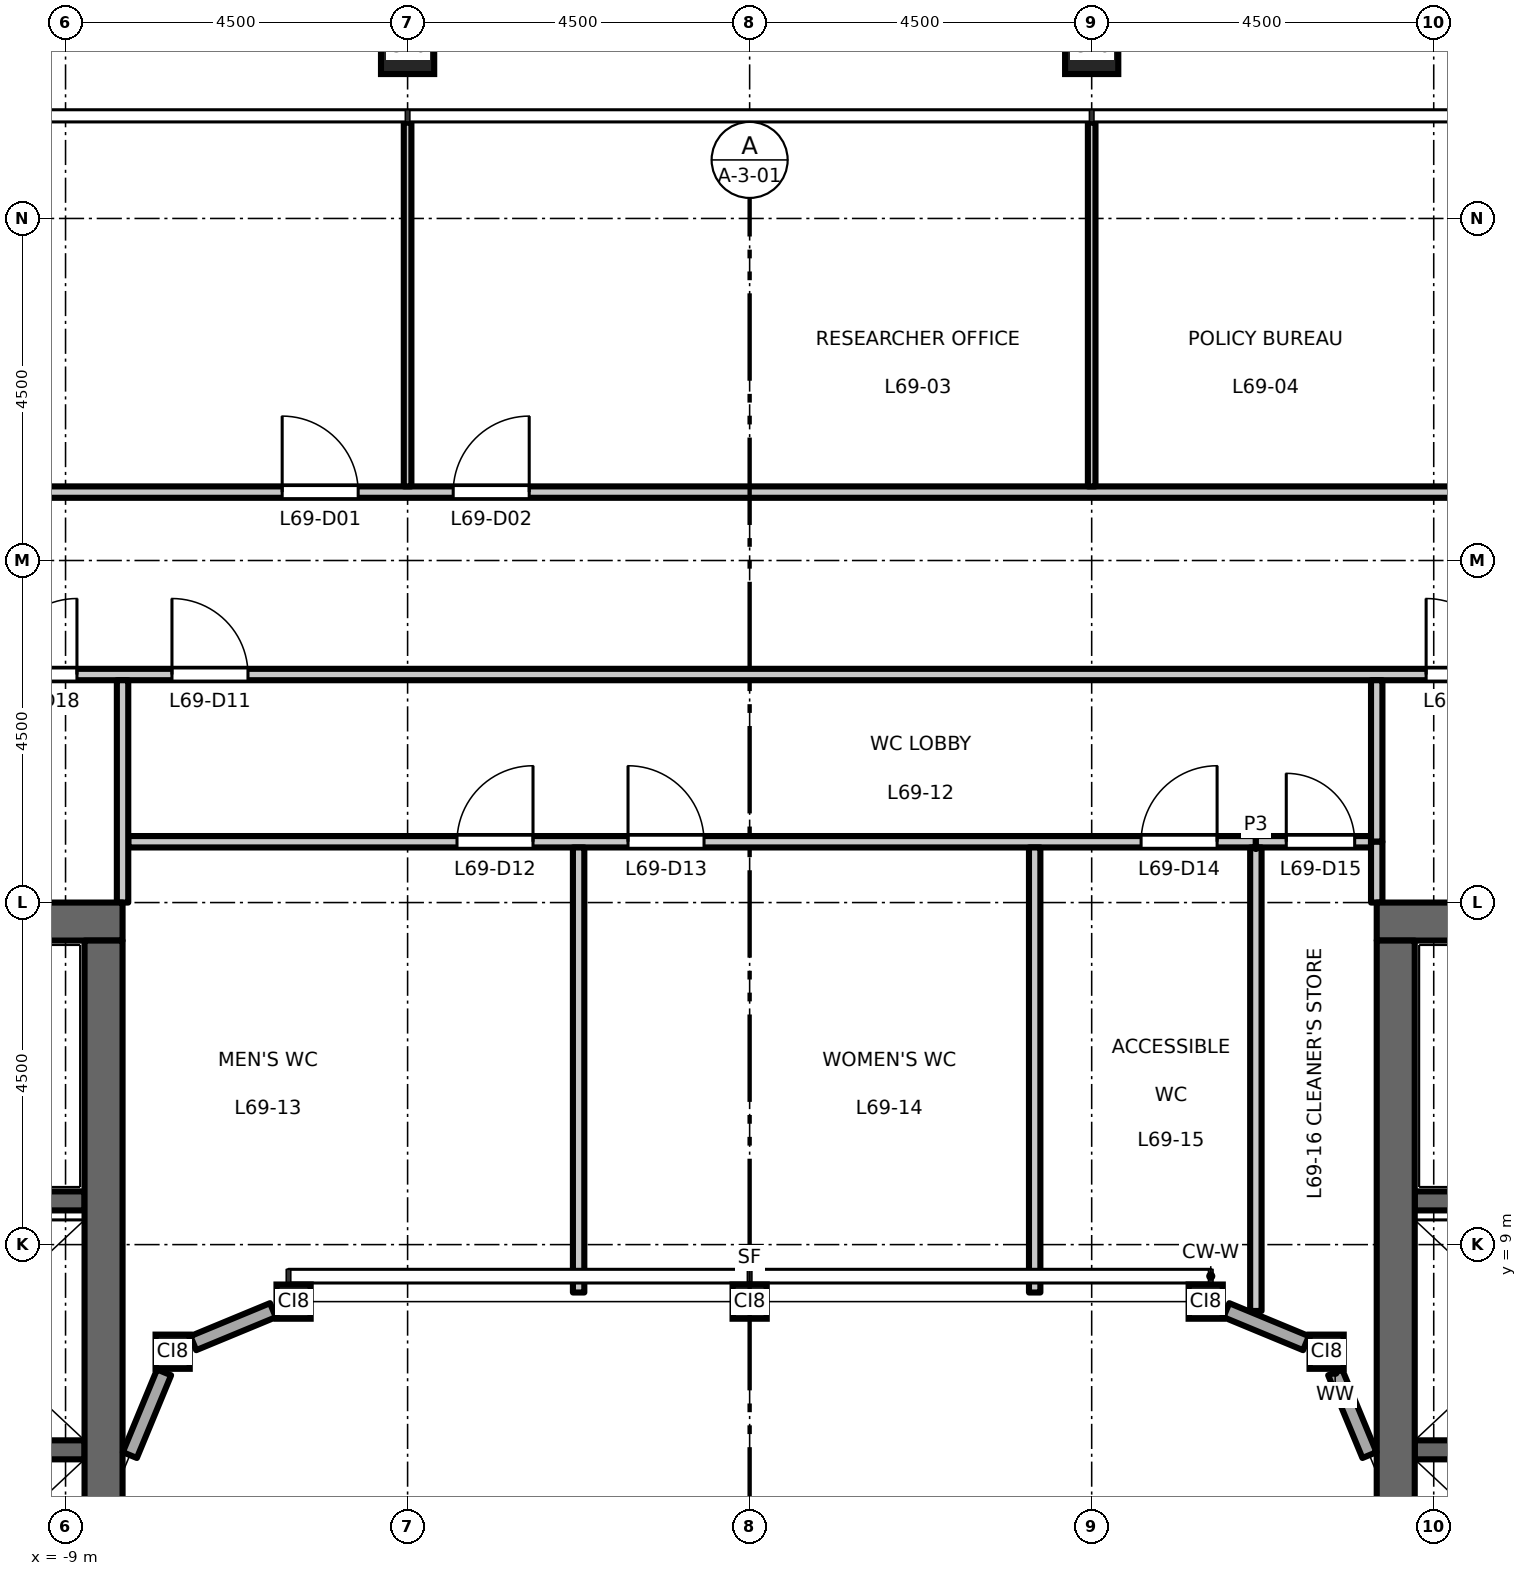
"""IFC4 building model, lengths in metres.
Left out: names, types, materials, properties, quantities, classifications, styles, units other than length and angle.
Written with IfcOpenShell. Run it as: python <this file> out.ifc"""

import sys

from ifc_helpers import new_model, si_unit, direction, frame, frame_2d, origin, origin_2d, place, context, subcontext, project, spatial, rectangle, hollow_rectangle, extrude, element, fill, save


model = new_model("IFC4")
c1 = context("Model", 3, precision=1e-05, world=origin(), true_north=direction((0.0, 1.0)))
c2 = subcontext(c1, "Body", "Model", "MODEL_VIEW")
j1 = project(units=[si_unit("LENGTHUNIT", "METRE"), si_unit("PLANEANGLEUNIT", "RADIAN")], contexts=[c1])
p1 = place(None, origin())
s1 = spatial("IfcSite", under=j1, at=p1, CompositionType="ELEMENT")
p2 = place(p1, origin())
s2 = spatial("IfcBuilding", under=s1, at=p2, CompositionType="ELEMENT")
p3 = place(p2, frame((0.0, 0.0, 321.2)))
s3 = spatial("IfcBuildingStorey", under=s2, at=p3, CompositionType="ELEMENT", Elevation=321.2)
for number, where, z_axis, x_axis in (
    (1, (4.5, 24.75, 0.0), (0.0, 0.0, 1.0), (1.0, 0.0, 0.0)),
    (2, (-4.5, 24.75, 0.0), (0.0, 0.0, 1.0), (1.0, 0.0, 0.0)),
):
    element("IfcColumn", number, at=place(p3, frame(where, z_axis=z_axis, x_axis=x_axis)), inside=s3, PredefinedType="COLUMN", context=c2, shape_type="SweptSolid", body=[
        extrude(hollow_rectangle(XDim=0.7, YDim=0.7, WallThickness=0.036, at=origin_2d()), origin(), (0.0, 0.0, 1.0), 4.5),
    ])
for number, where, z_axis, x_axis in (
    (3, (-7.591, 7.591, 0.0), (0.0, 0.0, 1.0), (1.0, 0.0, 0.0)),
    (4, (-6.0, 8.25, 0.0), (0.0, 0.0, 1.0), (1.0, 0.0, 0.0)),
    (5, (0.0, 8.25, 0.0), (0.0, 0.0, 1.0), (1.0, 0.0, 0.0)),
    (6, (6.0, 8.25, 0.0), (0.0, 0.0, 1.0), (1.0, 0.0, 0.0)),
    (7, (7.591, 7.591, 0.0), (0.0, 0.0, 1.0), (1.0, 0.0, 0.0)),
):
    element("IfcColumn", number, at=place(p3, frame(where, z_axis=z_axis, x_axis=x_axis)), inside=s3, PredefinedType="COLUMN", context=c2, shape_type="SweptSolid", body=[
        extrude(hollow_rectangle(XDim=0.45, YDim=0.45, WallThickness=0.022, at=origin_2d()), origin(), (0.0, 0.0, 1.0), 4.5),
    ])
p4 = place(p3, frame((-8.75, 6.3, 0.0), z_axis=(0.0, 0.0, 1.0), x_axis=(-1.0, 0.0, 0.0)))
e8 = element("IfcWall", 8, at=p4, inside=s3, PredefinedType="SHEAR", context=c2, shape_type="SweptSolid", body=[
    extrude(rectangle(XDim=3.1, YDim=0.25, at=frame_2d((1.55, 0.0))), origin(), (0.0, 0.0, 1.0), 4.35),
])
p5 = place(p3, frame((-8.75, 9.575, 0.0), z_axis=(0.0, 0.0, 1.0), x_axis=(-1.0, 0.0, 0.0)))
e9 = element("IfcWall", 9, at=p5, inside=s3, PredefinedType="SHEAR", context=c2, shape_type="SweptSolid", body=[
    extrude(rectangle(XDim=8.0, YDim=0.25, at=frame_2d((4.0, 0.0))), origin(), (0.0, 0.0, 1.0), 4.35),
])
p6 = place(p5, frame((6.65, 0.0, 0.0)))
e10 = element("IfcOpeningElement", 10, at=p6, cuts=e9, PredefinedType="OPENING", context=c2, shape_type="SweptSolid", body=[
    extrude(rectangle(XDim=1.1, YDim=2.1, at=frame_2d((0.55, 1.05))), frame((0.0, 0.135, 0.0), z_axis=(0.0, -1.0, 0.0), x_axis=(1.0, 0.0, 0.0)), (0.0, 0.0, 1.0), 0.27),
])
p7 = place(p3, frame((-8.25, 13.25, 0.0), z_axis=(0.0, 0.0, 1.0), x_axis=(-1.0, 0.0, 0.0)))
e11 = element("IfcWall", 11, at=p7, inside=s3, PredefinedType="SHEAR", context=c2, shape_type="SweptSolid", body=[
    extrude(rectangle(XDim=9.0, YDim=0.5, at=frame_2d((4.5, 0.0))), origin(), (0.0, 0.0, 1.0), 4.35),
])
p8 = place(p3, frame((-8.5, -13.0, 0.0), z_axis=(0.0, 0.0, 1.0), x_axis=(0.0, 1.0, 0.0)))
e12 = element("IfcWall", 12, at=p8, inside=s3, PredefinedType="SHEAR", context=c2, shape_type="SweptSolid", body=[
    extrude(rectangle(XDim=26.0, YDim=0.5, at=frame_2d((13.0, 0.0))), origin(), (0.0, 0.0, 1.0), 4.35),
])
p9 = place(p3, frame((8.75, 6.3, 0.0), z_axis=(0.0, 0.0, 1.0), x_axis=(1.0, 0.0, 0.0)))
e13 = element("IfcWall", 13, at=p9, inside=s3, PredefinedType="SHEAR", context=c2, shape_type="SweptSolid", body=[
    extrude(rectangle(XDim=3.1, YDim=0.25, at=frame_2d((1.55, 0.0))), origin(), (0.0, 0.0, 1.0), 4.35),
])
p10 = place(p3, frame((8.75, 9.575, 0.0), z_axis=(0.0, 0.0, 1.0), x_axis=(1.0, 0.0, 0.0)))
e14 = element("IfcWall", 14, at=p10, inside=s3, PredefinedType="SHEAR", context=c2, shape_type="SweptSolid", body=[
    extrude(rectangle(XDim=8.0, YDim=0.25, at=frame_2d((4.0, 0.0))), origin(), (0.0, 0.0, 1.0), 4.35),
])
p11 = place(p10, frame((6.65, 0.0, 0.0)))
e15 = element("IfcOpeningElement", 15, at=p11, cuts=e14, PredefinedType="OPENING", context=c2, shape_type="SweptSolid", body=[
    extrude(rectangle(XDim=1.1, YDim=2.1, at=frame_2d((0.55, 1.05))), frame((0.0, 0.135, 0.0), z_axis=(0.0, -1.0, 0.0), x_axis=(1.0, 0.0, 0.0)), (0.0, 0.0, 1.0), 0.27),
])
p12 = place(p3, frame((8.25, 13.25, 0.0), z_axis=(0.0, 0.0, 1.0), x_axis=(1.0, 0.0, 0.0)))
e16 = element("IfcWall", 16, at=p12, inside=s3, PredefinedType="SHEAR", context=c2, shape_type="SweptSolid", body=[
    extrude(rectangle(XDim=9.0, YDim=0.5, at=frame_2d((4.5, 0.0))), origin(), (0.0, 0.0, 1.0), 4.35),
])
p13 = place(p3, frame((8.5, -13.0, 0.0), z_axis=(0.0, 0.0, 1.0), x_axis=(0.0, 1.0, 0.0)))
e17 = element("IfcWall", 17, at=p13, inside=s3, PredefinedType="SHEAR", context=c2, shape_type="SweptSolid", body=[
    extrude(rectangle(XDim=26.0, YDim=0.5, at=frame_2d((13.0, 0.0))), origin(), (0.0, 0.0, 1.0), 4.35),
])
p14 = place(p3, frame((8.154, 6.231, 0.0), z_axis=(0.0, 0.0, 1.0), x_axis=(-0.382760542083, 0.92384758885, 0.0)))
e18 = element("IfcWall", 18, at=p14, inside=s3, PredefinedType="STANDARD", context=c2, shape_type="SweptSolid", body=[
    extrude(rectangle(XDim=1.178, YDim=0.2, at=frame_2d((0.589, 0.0))), origin(), (0.0, 0.0, 1.0), 4.01),
])
for number, where, z_axis, x_axis in (
    (19, (7.319, 7.703, 0.0), (0.0, 0.0, 1.0), (-0.924, 0.383, 0.0)),
    (20, (-6.271, 8.137, 0.0), (0.0, 0.0, 1.0), (-0.924, -0.383, 0.0)),
):
    element("IfcWall", number, at=place(p3, frame(where, z_axis=z_axis, x_axis=x_axis)), inside=s3, PredefinedType="STANDARD", context=c2, shape_type="SweptSolid", body=[
        extrude(rectangle(XDim=1.134, YDim=0.2, at=frame_2d((0.567, 0.0))), origin(), (0.0, 0.0, 1.0), 4.01),
    ])
p15 = place(p3, frame((-7.703, 7.319, 0.0), z_axis=(0.0, 0.0, 1.0), x_axis=(-0.382760542083, -0.92384758885, 0.0)))
e21 = element("IfcWall", 21, at=p15, inside=s3, PredefinedType="STANDARD", context=c2, shape_type="SweptSolid", body=[
    extrude(rectangle(XDim=1.178, YDim=0.2, at=frame_2d((0.589, 0.0))), origin(), (0.0, 0.0, 1.0), 4.01),
])
p16 = place(p3, frame((-8.175, 14.3, 0.0), z_axis=(0.0, 0.0, 1.0), x_axis=(1.0, 0.0, 0.0)))
e22 = element("IfcWall", 22, at=p16, inside=s3, PredefinedType="PARTITIONING", context=c2, shape_type="SweptSolid", body=[
    extrude(rectangle(XDim=14.835, YDim=0.15, at=frame_2d((7.417, 0.0))), origin(), (0.0, 0.0, 1.0), 4.35),
])
p17 = place(p16, frame((4.325, 0.0, 0.0)))
e23 = element("IfcOpeningElement", 23, at=p17, cuts=e22, PredefinedType="OPENING", context=c2, shape_type="SweptSolid", body=[
    extrude(rectangle(XDim=1.0, YDim=2.1, at=frame_2d((0.5, 1.05))), frame((0.0, 0.085, 0.0), z_axis=(0.0, -1.0, 0.0), x_axis=(1.0, 0.0, 0.0)), (0.0, 0.0, 1.0), 0.17),
])
p18 = place(p16, frame((6.575, 0.0, 0.0)))
e24 = element("IfcOpeningElement", 24, at=p18, cuts=e22, PredefinedType="OPENING", context=c2, shape_type="SweptSolid", body=[
    extrude(rectangle(XDim=1.0, YDim=2.1, at=frame_2d((0.5, 1.05))), frame((0.0, 0.085, 0.0), z_axis=(0.0, -1.0, 0.0), x_axis=(1.0, 0.0, 0.0)), (0.0, 0.0, 1.0), 0.17),
])
p19 = place(p16, frame((13.325, 0.0, 0.0)))
e25 = element("IfcOpeningElement", 25, at=p19, cuts=e22, PredefinedType="OPENING", context=c2, shape_type="SweptSolid", body=[
    extrude(rectangle(XDim=1.0, YDim=2.1, at=frame_2d((0.5, 1.05))), frame((0.0, 0.085, 0.0), z_axis=(0.0, -1.0, 0.0), x_axis=(1.0, 0.0, 0.0)), (0.0, 0.0, 1.0), 0.17),
])
p20 = place(p3, frame((6.66, 14.3, 0.0), z_axis=(0.0, 0.0, 1.0), x_axis=(1.0, 0.0, 0.0)))
e26 = element("IfcWall", 26, at=p20, inside=s3, PredefinedType="PARTITIONING", context=c2, shape_type="SweptSolid", body=[
    extrude(rectangle(XDim=1.515, YDim=0.15, at=frame_2d((0.758, 0.0))), origin(), (0.0, 0.0, 1.0), 4.35),
])
p21 = place(p20, frame((0.4, 0.0, 0.0)))
e27 = element("IfcOpeningElement", 27, at=p21, cuts=e26, PredefinedType="OPENING", context=c2, shape_type="SweptSolid", body=[
    extrude(rectangle(XDim=0.9, YDim=2.1, at=frame_2d((0.45, 1.05))), frame((0.0, 0.085, 0.0), z_axis=(0.0, -1.0, 0.0), x_axis=(1.0, 0.0, 0.0)), (0.0, 0.0, 1.0), 0.17),
])
p22 = place(p3, frame((-17.325, 16.5, 0.0), z_axis=(0.0, 0.0, 1.0), x_axis=(1.0, 0.0, 0.0)))
e28 = element("IfcWall", 28, at=p22, inside=s3, PredefinedType="PARTITIONING", context=c2, shape_type="SweptSolid", body=[
    extrude(rectangle(XDim=34.65, YDim=0.15, at=frame_2d((17.325, 0.0))), origin(), (0.0, 0.0, 1.0), 4.35),
])
p23 = place(p22, frame((9.725, 0.0, 0.0)))
e29 = element("IfcOpeningElement", 29, at=p23, cuts=e28, PredefinedType="OPENING", context=c2, shape_type="SweptSolid", body=[
    extrude(rectangle(XDim=1.0, YDim=2.1, at=frame_2d((0.5, 1.05))), frame((0.0, 0.085, 0.0), z_axis=(0.0, -1.0, 0.0), x_axis=(1.0, 0.0, 0.0)), (0.0, 0.0, 1.0), 0.17),
])
p24 = place(p22, frame((7.475, 0.0, 0.0)))
e30 = element("IfcOpeningElement", 30, at=p24, cuts=e28, PredefinedType="OPENING", context=c2, shape_type="SweptSolid", body=[
    extrude(rectangle(XDim=1.0, YDim=2.1, at=frame_2d((0.5, 1.05))), frame((0.0, 0.085, 0.0), z_axis=(0.0, -1.0, 0.0), x_axis=(1.0, 0.0, 0.0)), (0.0, 0.0, 1.0), 0.17),
])
p25 = place(p22, frame((26.225, 0.0, 0.0)))
e31 = element("IfcOpeningElement", 31, at=p25, cuts=e28, PredefinedType="OPENING", context=c2, shape_type="SweptSolid", body=[
    extrude(rectangle(XDim=1.0, YDim=2.1, at=frame_2d((0.5, 1.05))), frame((0.0, 0.085, 0.0), z_axis=(0.0, -1.0, 0.0), x_axis=(1.0, 0.0, 0.0)), (0.0, 0.0, 1.0), 0.17),
])
p26 = place(p3, frame((-21.441, 18.9, 0.0), z_axis=(0.0, 0.0, 1.0), x_axis=(1.0, 0.0, 0.0)))
e32 = element("IfcWall", 32, at=p26, inside=s3, PredefinedType="PARTITIONING", context=c2, shape_type="SweptSolid", body=[
    extrude(rectangle(XDim=42.882, YDim=0.15, at=frame_2d((21.441, 0.0))), origin(), (0.0, 0.0, 1.0), 4.35),
])
p27 = place(p26, frame((15.291, 0.0, 0.0)))
e33 = element("IfcOpeningElement", 33, at=p27, cuts=e32, PredefinedType="OPENING", context=c2, shape_type="SweptSolid", body=[
    extrude(rectangle(XDim=1.0, YDim=2.1, at=frame_2d((0.5, 1.05))), frame((0.0, 0.085, 0.0), z_axis=(0.0, -1.0, 0.0), x_axis=(1.0, 0.0, 0.0)), (0.0, 0.0, 1.0), 0.17),
])
p28 = place(p26, frame((17.541, 0.0, 0.0)))
e34 = element("IfcOpeningElement", 34, at=p28, cuts=e32, PredefinedType="OPENING", context=c2, shape_type="SweptSolid", body=[
    extrude(rectangle(XDim=1.0, YDim=2.1, at=frame_2d((0.5, 1.05))), frame((0.0, 0.085, 0.0), z_axis=(0.0, -1.0, 0.0), x_axis=(1.0, 0.0, 0.0)), (0.0, 0.0, 1.0), 0.17),
])
p29 = place(p26, frame((33.291, 0.0, 0.0)))
e35 = element("IfcOpeningElement", 35, at=p29, cuts=e32, PredefinedType="OPENING", context=c2, shape_type="SweptSolid", body=[
    extrude(rectangle(XDim=1.0, YDim=2.1, at=frame_2d((0.5, 1.05))), frame((0.0, 0.085, 0.0), z_axis=(0.0, -1.0, 0.0), x_axis=(1.0, 0.0, 0.0)), (0.0, 0.0, 1.0), 0.17),
])
p30 = place(p26, frame((6.291, 0.0, 0.0)))
e36 = element("IfcOpeningElement", 36, at=p30, cuts=e32, PredefinedType="OPENING", context=c2, shape_type="SweptSolid", body=[
    extrude(rectangle(XDim=1.0, YDim=2.1, at=frame_2d((0.5, 1.05))), frame((0.0, 0.085, 0.0), z_axis=(0.0, -1.0, 0.0), x_axis=(1.0, 0.0, 0.0)), (0.0, 0.0, 1.0), 0.17),
])
p31 = place(p26, frame((35.482, 0.0, 0.0)))
e37 = element("IfcOpeningElement", 37, at=p31, cuts=e32, PredefinedType="OPENING", context=c2, shape_type="SweptSolid", body=[
    extrude(rectangle(XDim=1.0, YDim=2.1, at=frame_2d((0.5, 1.05))), frame((0.0, 0.085, 0.0), z_axis=(0.0, -1.0, 0.0), x_axis=(1.0, 0.0, 0.0)), (0.0, 0.0, 1.0), 0.17),
])
p32 = place(p3, frame((-8.25, 13.5, 0.0), z_axis=(0.0, 0.0, 1.0), x_axis=(0.0, 1.0, 0.0)))
e38 = element("IfcWall", 38, at=p32, inside=s3, PredefinedType="PARTITIONING", context=c2, shape_type="SweptSolid", body=[
    extrude(rectangle(XDim=2.925, YDim=0.15, at=frame_2d((1.462, 0.0))), origin(), (0.0, 0.0, 1.0), 4.35),
])
p33 = place(p3, frame((-4.5, 18.975, 0.0), z_axis=(0.0, 0.0, 1.0), x_axis=(0.0, 1.0, 0.0)))
e39 = element("IfcWall", 39, at=p33, inside=s3, PredefinedType="PARTITIONING", context=c2, shape_type="SweptSolid", body=[
    extrude(rectangle(XDim=4.785, YDim=0.1, at=frame_2d((2.393, 0.0))), origin(), (0.0, 0.0, 1.0), 3.65),
])
for number, where, z_axis, x_axis in (
    (40, (-2.25, 8.37, 0.0), (0.0, 0.0, 1.0), (0.0, 1.0, 0.0)),
    (41, (3.75, 8.37, 0.0), (0.0, 0.0, 1.0), (0.0, 1.0, 0.0)),
):
    element("IfcWall", number, at=place(p3, frame(where, z_axis=z_axis, x_axis=x_axis)), inside=s3, PredefinedType="PARTITIONING", context=c2, shape_type="SweptSolid", body=[
        extrude(rectangle(XDim=5.855, YDim=0.15, at=frame_2d((2.927, 0.0))), origin(), (0.0, 0.0, 1.0), 4.35),
    ])
p34 = place(p3, frame((4.5, 18.975, 0.0), z_axis=(0.0, 0.0, 1.0), x_axis=(0.0, 1.0, 0.0)))
e42 = element("IfcWall", 42, at=p34, inside=s3, PredefinedType="PARTITIONING", context=c2, shape_type="SweptSolid", body=[
    extrude(rectangle(XDim=4.785, YDim=0.1, at=frame_2d((2.393, 0.0))), origin(), (0.0, 0.0, 1.0), 3.65),
])
p35 = place(p3, frame((6.66, 8.127, 0.0), z_axis=(0.0, 0.0, 1.0), x_axis=(0.0, 1.0, 0.0)))
e43 = element("IfcWall", 43, at=p35, inside=s3, PredefinedType="PARTITIONING", context=c2, shape_type="SweptSolid", body=[
    extrude(rectangle(XDim=6.098, YDim=0.15, at=frame_2d((3.049, 0.0))), origin(), (0.0, 0.0, 1.0), 4.35),
])
p36 = place(p3, frame((8.25, 14.3, 0.0), z_axis=(0.0, 0.0, 1.0), x_axis=(0.0, 1.0, 0.0)))
e44 = element("IfcWall", 44, at=p36, inside=s3, PredefinedType="PARTITIONING", context=c2, shape_type="SweptSolid", body=[
    extrude(rectangle(XDim=2.125, YDim=0.15, at=frame_2d((1.062, 0.0))), origin(), (0.0, 0.0, 1.0), 4.35),
])
p37 = place(p3, frame((8.25, 13.5, 0.0), z_axis=(0.0, 0.0, 1.0), x_axis=(0.0, 1.0, 0.0)))
e45 = element("IfcWall", 45, at=p37, inside=s3, PredefinedType="PARTITIONING", context=c2, shape_type="SweptSolid", body=[
    extrude(rectangle(XDim=0.8, YDim=0.15, at=frame_2d((0.4, 0.0))), origin(), (0.0, 0.0, 1.0), 4.35),
])
p38 = place(p27, origin())
e46 = element("IfcDoor", 46, at=p38, inside=s3, OperationType="SINGLE_SWING_LEFT", PredefinedType="DOOR", context=c2, shape_type="SweptSolid", body=[
    extrude(rectangle(XDim=1.0, YDim=2.1, at=frame_2d((0.5, 1.05))), frame((0.0, 0.025, 0.0), z_axis=(0.0, -1.0, 0.0), x_axis=(1.0, 0.0, 0.0)), (0.0, 0.0, 1.0), 0.05),
])
fill(e33, e46)
p39 = place(p28, origin())
e47 = element("IfcDoor", 47, at=p39, inside=s3, OperationType="SINGLE_SWING_RIGHT", PredefinedType="DOOR", context=c2, shape_type="SweptSolid", body=[
    extrude(rectangle(XDim=1.0, YDim=2.1, at=frame_2d((0.5, 1.05))), frame((0.0, 0.025, 0.0), z_axis=(0.0, -1.0, 0.0), x_axis=(1.0, 0.0, 0.0)), (0.0, 0.0, 1.0), 0.05),
])
fill(e34, e47)
p40 = place(p23, origin())
e48 = element("IfcDoor", 48, at=p40, inside=s3, OperationType="SINGLE_SWING_LEFT", PredefinedType="DOOR", context=c2, shape_type="SweptSolid", body=[
    extrude(rectangle(XDim=1.0, YDim=2.1, at=frame_2d((0.5, 1.05))), frame((0.0, 0.025, 0.0), z_axis=(0.0, -1.0, 0.0), x_axis=(1.0, 0.0, 0.0)), (0.0, 0.0, 1.0), 0.05),
])
fill(e29, e48)
p41 = place(p17, origin())
e49 = element("IfcDoor", 49, at=p41, inside=s3, OperationType="SINGLE_SWING_RIGHT", PredefinedType="DOOR", context=c2, shape_type="SweptSolid", body=[
    extrude(rectangle(XDim=1.0, YDim=2.1, at=frame_2d((0.5, 1.05))), frame((0.0, 0.025, 0.0), z_axis=(0.0, -1.0, 0.0), x_axis=(1.0, 0.0, 0.0)), (0.0, 0.0, 1.0), 0.05),
])
fill(e23, e49)
p42 = place(p18, origin())
e50 = element("IfcDoor", 50, at=p42, inside=s3, OperationType="SINGLE_SWING_LEFT", PredefinedType="DOOR", context=c2, shape_type="SweptSolid", body=[
    extrude(rectangle(XDim=1.0, YDim=2.1, at=frame_2d((0.5, 1.05))), frame((0.0, 0.025, 0.0), z_axis=(0.0, -1.0, 0.0), x_axis=(1.0, 0.0, 0.0)), (0.0, 0.0, 1.0), 0.05),
])
fill(e24, e50)
p43 = place(p19, origin())
e51 = element("IfcDoor", 51, at=p43, inside=s3, OperationType="SINGLE_SWING_RIGHT", PredefinedType="DOOR", context=c2, shape_type="SweptSolid", body=[
    extrude(rectangle(XDim=1.0, YDim=2.1, at=frame_2d((0.5, 1.05))), frame((0.0, 0.025, 0.0), z_axis=(0.0, -1.0, 0.0), x_axis=(1.0, 0.0, 0.0)), (0.0, 0.0, 1.0), 0.05),
])
fill(e25, e51)
p44 = place(p21, origin())
e52 = element("IfcDoor", 52, at=p44, inside=s3, OperationType="SINGLE_SWING_LEFT", PredefinedType="DOOR", context=c2, shape_type="SweptSolid", body=[
    extrude(rectangle(XDim=0.9, YDim=2.1, at=frame_2d((0.45, 1.05))), frame((0.0, 0.025, 0.0), z_axis=(0.0, -1.0, 0.0), x_axis=(1.0, 0.0, 0.0)), (0.0, 0.0, 1.0), 0.05),
])
fill(e27, e52)
p45 = place(p24, origin())
e53 = element("IfcDoor", 53, at=p45, inside=s3, OperationType="SINGLE_SWING_RIGHT", PredefinedType="DOOR", context=c2, shape_type="SweptSolid", body=[
    extrude(rectangle(XDim=1.0, YDim=2.1, at=frame_2d((0.5, 1.05))), frame((0.0, 0.025, 0.0), z_axis=(0.0, -1.0, 0.0), x_axis=(1.0, 0.0, 0.0)), (0.0, 0.0, 1.0), 0.05),
])
fill(e30, e53)
p46 = place(p25, origin())
e54 = element("IfcDoor", 54, at=p46, inside=s3, OperationType="SINGLE_SWING_LEFT", PredefinedType="DOOR", context=c2, shape_type="SweptSolid", body=[
    extrude(rectangle(XDim=1.0, YDim=2.1, at=frame_2d((0.5, 1.05))), frame((0.0, 0.025, 0.0), z_axis=(0.0, -1.0, 0.0), x_axis=(1.0, 0.0, 0.0)), (0.0, 0.0, 1.0), 0.05),
])
fill(e31, e54)
save(model, sys.argv[1])
